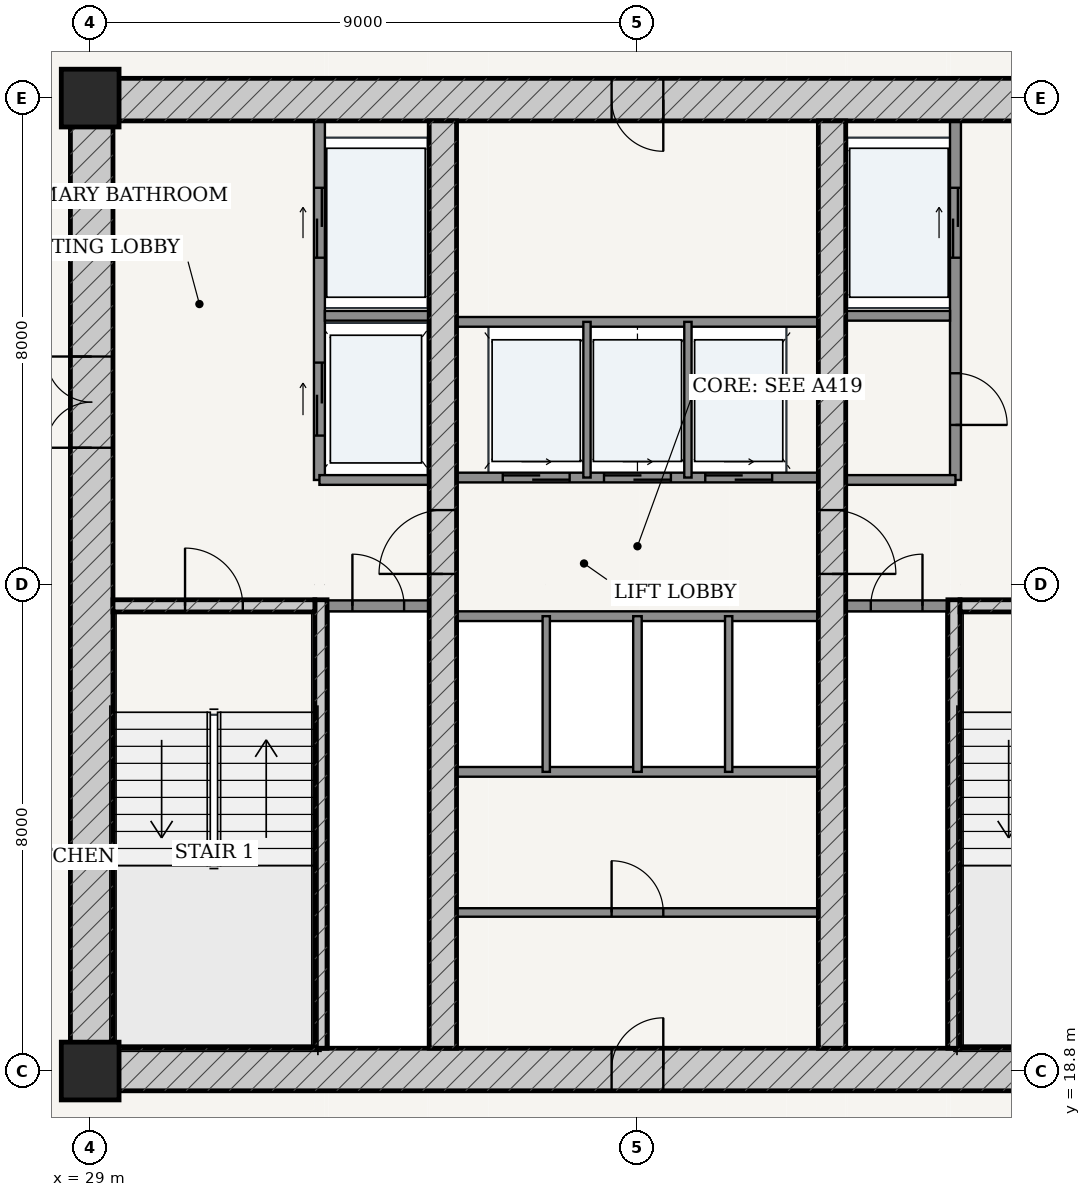
"""IFC4 building model, lengths in metres.
Left out: names, types, materials, properties, quantities, classifications, styles, units other than length and angle.
Written with IfcOpenShell. Run it as: python <this file> out.ifc"""

import sys

from ifc_helpers import new_model, si_unit, direction, frame, frame_2d, origin, origin_2d, place, context, subcontext, project, spatial, rectangle, extrude, source, transform, mapped, element, fill, save


model = new_model("IFC4")
c1 = context("Model", 3, precision=1e-05, world=origin(), true_north=direction((-0.2419218956, 0.970295726276)))
c2 = subcontext(c1, "Body", "Model", "MODEL_VIEW")
j1 = project(units=[si_unit("LENGTHUNIT", "METRE"), si_unit("PLANEANGLEUNIT", "RADIAN")], contexts=[c1])
p1 = place(None, origin())
s1 = spatial("IfcSite", under=j1, at=p1, CompositionType="ELEMENT")
p2 = place(p1, origin())
s2 = spatial("IfcBuilding", under=s1, at=p2, CompositionType="ELEMENT")
p3 = place(p2, frame((0.0, 0.0, 126.6)))
s3 = spatial("IfcBuildingStorey", under=s2, at=p3, CompositionType="ELEMENT", Elevation=126.6)
for number, where, z_axis, x_axis in (
    (1, (29.0, 18.8, 0.0), (0.0, 0.0, 1.0), (1.0, 0.0, 0.0)),
    (2, (29.0, 34.8, 0.0), (0.0, 0.0, 1.0), (1.0, 0.0, 0.0)),
):
    element("IfcColumn", number, at=place(p3, frame(where, z_axis=z_axis, x_axis=x_axis)), inside=s3, PredefinedType="COLUMN", context=c2, shape_type="SweptSolid", body=[
        extrude(rectangle(XDim=0.95, YDim=0.95, at=origin_2d()), origin(), (0.0, 0.0, 1.0), 3.6),
    ])
p4 = place(p3, frame((28.675, 18.825, 0.0), z_axis=(0.0, 0.0, 1.0), x_axis=(1.0, 0.0, 0.0)))
e3 = element("IfcWall", 3, at=p4, inside=s3, PredefinedType="SHEAR", context=c2, shape_type="SweptSolid", body=[
    extrude(rectangle(XDim=18.65, YDim=0.7, at=frame_2d((9.325, 0.0))), origin(), (0.0, 0.0, 1.0), 3.15),
])
p5 = place(p4, frame((8.9, 0.0, 0.0)))
e4 = element("IfcOpeningElement", 4, at=p5, cuts=e3, PredefinedType="OPENING", context=c2, shape_type="SweptSolid", body=[
    extrude(rectangle(XDim=0.85, YDim=2.1, at=frame_2d((0.425, 1.05))), frame((0.0, 0.36, 0.0), z_axis=(0.0, -1.0, 0.0), x_axis=(1.0, 0.0, 0.0)), (0.0, 0.0, 1.0), 0.72),
])
p6 = place(p3, frame((28.675, 34.775, 0.0), z_axis=(0.0, 0.0, 1.0), x_axis=(1.0, 0.0, 0.0)))
e5 = element("IfcWall", 5, at=p6, inside=s3, PredefinedType="SHEAR", context=c2, shape_type="SweptSolid", body=[
    extrude(rectangle(XDim=18.65, YDim=0.7, at=frame_2d((9.325, 0.0))), origin(), (0.0, 0.0, 1.0), 3.15),
])
p7 = place(p6, frame((8.9, 0.0, 0.0)))
e6 = element("IfcOpeningElement", 6, at=p7, cuts=e5, PredefinedType="OPENING", context=c2, shape_type="SweptSolid", body=[
    extrude(rectangle(XDim=0.85, YDim=2.1, at=frame_2d((0.425, 1.05))), frame((0.0, 0.36, 0.0), z_axis=(0.0, -1.0, 0.0), x_axis=(1.0, 0.0, 0.0)), (0.0, 0.0, 1.0), 0.72),
])
p8 = place(p3, frame((29.025, 19.175, 0.0), z_axis=(0.0, 0.0, 1.0), x_axis=(0.0, 1.0, 0.0)))
e7 = element("IfcWall", 7, at=p8, inside=s3, PredefinedType="SHEAR", context=c2, shape_type="SweptSolid", body=[
    extrude(rectangle(XDim=15.25, YDim=0.7, at=frame_2d((7.625, 0.0))), origin(), (0.0, 0.0, 1.0), 3.15),
])
p9 = place(p8, frame((9.875, 0.0, 0.0)))
e8 = element("IfcOpeningElement", 8, at=p9, cuts=e7, PredefinedType="OPENING", context=c2, shape_type="SweptSolid", body=[
    extrude(rectangle(XDim=1.5, YDim=2.2, at=frame_2d((0.75, 1.1))), frame((0.0, 0.36, 0.0), z_axis=(0.0, -1.0, 0.0), x_axis=(1.0, 0.0, 0.0)), (0.0, 0.0, 1.0), 0.72),
])
p10 = place(p3, frame((32.795, 19.175, 0.0), z_axis=(0.0, 0.0, 1.0), x_axis=(0.0, 1.0, 0.0)))
e9 = element("IfcWall", 9, at=p10, inside=s3, PredefinedType="SOLIDWALL", context=c2, shape_type="SweptSolid", body=[
    extrude(rectangle(XDim=7.375, YDim=0.2, at=frame_2d((3.688, 0.0))), origin(), (0.0, 0.0, 1.0), 3.15),
])
p11 = place(p3, frame((29.375, 26.45, 0.0), z_axis=(0.0, 0.0, 1.0), x_axis=(1.0, 0.0, 0.0)))
e10 = element("IfcWall", 10, at=p11, inside=s3, PredefinedType="SOLIDWALL", context=c2, shape_type="SweptSolid", body=[
    extrude(rectangle(XDim=3.32, YDim=0.2, at=frame_2d((1.66, 0.0))), origin(), (0.0, 0.0, 1.0), 3.15),
])
p12 = place(p11, frame((1.185, 0.0, 0.0)))
e11 = element("IfcOpeningElement", 11, at=p12, cuts=e10, PredefinedType="OPENING", context=c2, shape_type="SweptSolid", body=[
    extrude(rectangle(XDim=0.95, YDim=2.15, at=frame_2d((0.475, 1.075))), frame((0.0, 0.11, 0.0), z_axis=(0.0, -1.0, 0.0), x_axis=(1.0, 0.0, 0.0)), (0.0, 0.0, 1.0), 0.22),
])
p13 = place(p3, frame((43.205, 19.175, 0.0), z_axis=(0.0, 0.0, 1.0), x_axis=(0.0, 1.0, 0.0)))
e12 = element("IfcWall", 12, at=p13, inside=s3, PredefinedType="SOLIDWALL", context=c2, shape_type="SweptSolid", body=[
    extrude(rectangle(XDim=7.375, YDim=0.2, at=frame_2d((3.688, 0.0))), origin(), (0.0, 0.0, 1.0), 3.15),
])
p14 = place(p3, frame((43.305, 26.45, 0.0), z_axis=(0.0, 0.0, 1.0), x_axis=(1.0, 0.0, 0.0)))
e13 = element("IfcWall", 13, at=p14, inside=s3, PredefinedType="SOLIDWALL", context=c2, shape_type="SweptSolid", body=[
    extrude(rectangle(XDim=3.32, YDim=0.2, at=frame_2d((1.66, 0.0))), origin(), (0.0, 0.0, 1.0), 3.15),
])
p15 = place(p14, frame((1.185, 0.0, 0.0)))
e14 = element("IfcOpeningElement", 14, at=p15, cuts=e13, PredefinedType="OPENING", context=c2, shape_type="SweptSolid", body=[
    extrude(rectangle(XDim=0.95, YDim=2.15, at=frame_2d((0.475, 1.075))), frame((0.0, 0.11, 0.0), z_axis=(0.0, -1.0, 0.0), x_axis=(1.0, 0.0, 0.0)), (0.0, 0.0, 1.0), 0.22),
])
p16 = place(p3, frame((34.8, 19.175, 0.0), z_axis=(0.0, 0.0, 1.0), x_axis=(0.0, 1.0, 0.0)))
e15 = element("IfcWall", 15, at=p16, inside=s3, PredefinedType="SHEAR", context=c2, shape_type="SweptSolid", body=[
    extrude(rectangle(XDim=15.25, YDim=0.45, at=frame_2d((7.625, 0.0))), origin(), (0.0, 0.0, 1.0), 3.15),
])
p17 = place(p16, frame((7.8, 0.0, 0.0)))
e16 = element("IfcOpeningElement", 16, at=p17, cuts=e15, PredefinedType="OPENING", context=c2, shape_type="SweptSolid", body=[
    extrude(rectangle(XDim=1.05, YDim=2.15, at=frame_2d((0.525, 1.075))), frame((0.0, 0.235, 0.0), z_axis=(0.0, -1.0, 0.0), x_axis=(1.0, 0.0, 0.0)), (0.0, 0.0, 1.0), 0.47),
])
p18 = place(p3, frame((41.2, 19.175, 0.0), z_axis=(0.0, 0.0, 1.0), x_axis=(0.0, 1.0, 0.0)))
e17 = element("IfcWall", 17, at=p18, inside=s3, PredefinedType="SHEAR", context=c2, shape_type="SweptSolid", body=[
    extrude(rectangle(XDim=15.25, YDim=0.45, at=frame_2d((7.625, 0.0))), origin(), (0.0, 0.0, 1.0), 3.15),
])
p19 = place(p18, frame((7.8, 0.0, 0.0)))
e18 = element("IfcOpeningElement", 18, at=p19, cuts=e17, PredefinedType="OPENING", context=c2, shape_type="SweptSolid", body=[
    extrude(rectangle(XDim=1.05, YDim=2.15, at=frame_2d((0.525, 1.075))), frame((0.0, 0.235, 0.0), z_axis=(0.0, -1.0, 0.0), x_axis=(1.0, 0.0, 0.0)), (0.0, 0.0, 1.0), 0.47),
])
p20 = place(p3, frame((32.9, 26.45, 0.0), z_axis=(0.0, 0.0, 1.0), x_axis=(1.0, 0.0, 0.0)))
e19 = element("IfcWall", 19, at=p20, inside=s3, PredefinedType="PARTITIONING", context=c2, shape_type="SweptSolid", body=[
    extrude(rectangle(XDim=1.675, YDim=0.18, at=frame_2d((0.837, 0.0))), origin(), (0.0, 0.0, 1.0), 3.15),
])
p21 = place(p20, frame((0.413, 0.0, 0.0)))
e20 = element("IfcOpeningElement", 20, at=p21, cuts=e19, PredefinedType="OPENING", context=c2, shape_type="SweptSolid", body=[
    extrude(rectangle(XDim=0.85, YDim=2.1, at=frame_2d((0.425, 1.05))), frame((0.0, 0.1, 0.0), z_axis=(0.0, -1.0, 0.0), x_axis=(1.0, 0.0, 0.0)), (0.0, 0.0, 1.0), 0.2),
])
p22 = place(p3, frame((41.425, 26.45, 0.0), z_axis=(0.0, 0.0, 1.0), x_axis=(1.0, 0.0, 0.0)))
e21 = element("IfcWall", 21, at=p22, inside=s3, PredefinedType="PARTITIONING", context=c2, shape_type="SweptSolid", body=[
    extrude(rectangle(XDim=1.675, YDim=0.18, at=frame_2d((0.837, 0.0))), origin(), (0.0, 0.0, 1.0), 3.15),
])
p23 = place(p22, frame((0.413, 0.0, 0.0)))
e22 = element("IfcOpeningElement", 22, at=p23, cuts=e21, PredefinedType="OPENING", context=c2, shape_type="SweptSolid", body=[
    extrude(rectangle(XDim=0.85, YDim=2.1, at=frame_2d((0.425, 1.05))), frame((0.0, 0.1, 0.0), z_axis=(0.0, -1.0, 0.0), x_axis=(1.0, 0.0, 0.0)), (0.0, 0.0, 1.0), 0.2),
])
p24 = place(p3, frame((32.77, 28.52, 0.0), z_axis=(0.0, 0.0, 1.0), x_axis=(0.0, 1.0, 0.0)))
e23 = element("IfcWall", 23, at=p24, inside=s3, PredefinedType="PARTITIONING", context=c2, shape_type="SweptSolid", body=[
    extrude(rectangle(XDim=5.905, YDim=0.18, at=frame_2d((2.953, 0.0))), origin(), (0.0, 0.0, 1.0), 3.15),
])
p25 = place(p24, frame((3.655, 0.0, 0.0)))
e24 = element("IfcOpeningElement", 24, at=p25, cuts=e23, PredefinedType="OPENING", context=c2, shape_type="SweptSolid", body=[
    extrude(rectangle(XDim=1.15, YDim=2.2, at=frame_2d((0.575, 1.1))), frame((0.0, 0.1, 0.0), z_axis=(0.0, -1.0, 0.0), x_axis=(1.0, 0.0, 0.0)), (0.0, 0.0, 1.0), 0.2),
])
p26 = place(p24, frame((0.73, 0.0, 0.0)))
e25 = element("IfcOpeningElement", 25, at=p26, cuts=e23, PredefinedType="OPENING", context=c2, shape_type="SweptSolid", body=[
    extrude(rectangle(XDim=1.2, YDim=2.25, at=frame_2d((0.6, 1.125))), frame((0.0, 0.1, 0.0), z_axis=(0.0, -1.0, 0.0), x_axis=(1.0, 0.0, 0.0)), (0.0, 0.0, 1.0), 0.2),
])
p27 = place(p3, frame((32.86, 31.22, 0.0), z_axis=(0.0, 0.0, 1.0), x_axis=(1.0, 0.0, 0.0)))
e26 = element("IfcWall", 26, at=p27, inside=s3, PredefinedType="PARTITIONING", context=c2, shape_type="SweptSolid", body=[
    extrude(rectangle(XDim=1.715, YDim=0.16, at=frame_2d((0.857, 0.0))), origin(), (0.0, 0.0, 1.0), 3.15),
])
p28 = place(p3, frame((32.77, 28.52, 0.0), z_axis=(0.0, 0.0, 1.0), x_axis=(1.0, 0.0, 0.0)))
e27 = element("IfcWall", 27, at=p28, inside=s3, PredefinedType="PARTITIONING", context=c2, shape_type="SweptSolid", body=[
    extrude(rectangle(XDim=1.805, YDim=0.16, at=frame_2d((0.902, 0.0))), origin(), (0.0, 0.0, 1.0), 3.15),
])
p29 = place(p3, frame((43.23, 28.52, 0.0), z_axis=(0.0, 0.0, 1.0), x_axis=(0.0, 1.0, 0.0)))
e28 = element("IfcWall", 28, at=p29, inside=s3, PredefinedType="PARTITIONING", context=c2, shape_type="SweptSolid", body=[
    extrude(rectangle(XDim=5.905, YDim=0.18, at=frame_2d((2.953, 0.0))), origin(), (0.0, 0.0, 1.0), 3.15),
])
p30 = place(p29, frame((0.905, 0.0, 0.0)))
e29 = element("IfcOpeningElement", 29, at=p30, cuts=e28, PredefinedType="OPENING", context=c2, shape_type="SweptSolid", body=[
    extrude(rectangle(XDim=0.85, YDim=2.1, at=frame_2d((0.425, 1.05))), frame((0.0, 0.1, 0.0), z_axis=(0.0, -1.0, 0.0), x_axis=(1.0, 0.0, 0.0)), (0.0, 0.0, 1.0), 0.2),
])
p31 = place(p29, frame((3.655, 0.0, 0.0)))
e30 = element("IfcOpeningElement", 30, at=p31, cuts=e28, PredefinedType="OPENING", context=c2, shape_type="SweptSolid", body=[
    extrude(rectangle(XDim=1.15, YDim=2.2, at=frame_2d((0.575, 1.1))), frame((0.0, 0.1, 0.0), z_axis=(0.0, -1.0, 0.0), x_axis=(1.0, 0.0, 0.0)), (0.0, 0.0, 1.0), 0.2),
])
p32 = place(p3, frame((41.425, 31.22, 0.0), z_axis=(0.0, 0.0, 1.0), x_axis=(1.0, 0.0, 0.0)))
e31 = element("IfcWall", 31, at=p32, inside=s3, PredefinedType="PARTITIONING", context=c2, shape_type="SweptSolid", body=[
    extrude(rectangle(XDim=1.715, YDim=0.16, at=frame_2d((0.857, 0.0))), origin(), (0.0, 0.0, 1.0), 3.15),
])
p33 = place(p3, frame((41.425, 28.52, 0.0), z_axis=(0.0, 0.0, 1.0), x_axis=(1.0, 0.0, 0.0)))
e32 = element("IfcWall", 32, at=p33, inside=s3, PredefinedType="PARTITIONING", context=c2, shape_type="SweptSolid", body=[
    extrude(rectangle(XDim=1.805, YDim=0.16, at=frame_2d((0.902, 0.0))), origin(), (0.0, 0.0, 1.0), 3.15),
])
p34 = place(p3, frame((35.025, 28.56, 0.0), z_axis=(0.0, 0.0, 1.0), x_axis=(1.0, 0.0, 0.0)))
e33 = element("IfcWall", 33, at=p34, inside=s3, PredefinedType="PARTITIONING", context=c2, shape_type="SweptSolid", body=[
    extrude(rectangle(XDim=5.95, YDim=0.16, at=frame_2d((2.975, 0.0))), origin(), (0.0, 0.0, 1.0), 3.15),
])
p35 = place(p34, frame((0.76, 0.0, 0.0)))
e34 = element("IfcOpeningElement", 34, at=p35, cuts=e33, PredefinedType="OPENING", context=c2, shape_type="SweptSolid", body=[
    extrude(rectangle(XDim=1.1, YDim=2.2, at=frame_2d((0.55, 1.1))), frame((0.0, 0.09, 0.0), z_axis=(0.0, -1.0, 0.0), x_axis=(1.0, 0.0, 0.0)), (0.0, 0.0, 1.0), 0.18),
])
p36 = place(p34, frame((2.425, 0.0, 0.0)))
e35 = element("IfcOpeningElement", 35, at=p36, cuts=e33, PredefinedType="OPENING", context=c2, shape_type="SweptSolid", body=[
    extrude(rectangle(XDim=1.1, YDim=2.2, at=frame_2d((0.55, 1.1))), frame((0.0, 0.09, 0.0), z_axis=(0.0, -1.0, 0.0), x_axis=(1.0, 0.0, 0.0)), (0.0, 0.0, 1.0), 0.18),
])
p37 = place(p34, frame((4.09, 0.0, 0.0)))
e36 = element("IfcOpeningElement", 36, at=p37, cuts=e33, PredefinedType="OPENING", context=c2, shape_type="SweptSolid", body=[
    extrude(rectangle(XDim=1.1, YDim=2.2, at=frame_2d((0.55, 1.1))), frame((0.0, 0.09, 0.0), z_axis=(0.0, -1.0, 0.0), x_axis=(1.0, 0.0, 0.0)), (0.0, 0.0, 1.0), 0.18),
])
p38 = place(p3, frame((35.025, 31.12, 0.0), z_axis=(0.0, 0.0, 1.0), x_axis=(1.0, 0.0, 0.0)))
e37 = element("IfcWall", 37, at=p38, inside=s3, PredefinedType="PARTITIONING", context=c2, shape_type="SweptSolid", body=[
    extrude(rectangle(XDim=5.95, YDim=0.16, at=frame_2d((2.975, 0.0))), origin(), (0.0, 0.0, 1.0), 3.15),
])
for number, where, z_axis, x_axis in (
    (38, (37.17, 28.56, 0.0), (0.0, 0.0, 1.0), (0.0, 1.0, 0.0)),
    (39, (38.83, 28.56, 0.0), (0.0, 0.0, 1.0), (0.0, 1.0, 0.0)),
):
    element("IfcWall", number, at=place(p3, frame(where, z_axis=z_axis, x_axis=x_axis)), inside=s3, PredefinedType="PARTITIONING", context=c2, shape_type="SweptSolid", body=[
        extrude(rectangle(XDim=2.56, YDim=0.12, at=frame_2d((1.28, 0.0))), origin(), (0.0, 0.0, 1.0), 3.15),
    ])
for number, where, z_axis, x_axis in (
    (40, (35.025, 26.28, 0.0), (0.0, 0.0, 1.0), (1.0, 0.0, 0.0)),
    (41, (35.025, 23.72, 0.0), (0.0, 0.0, 1.0), (1.0, 0.0, 0.0)),
):
    element("IfcWall", number, at=place(p3, frame(where, z_axis=z_axis, x_axis=x_axis)), inside=s3, PredefinedType="PARTITIONING", context=c2, shape_type="SweptSolid", body=[
        extrude(rectangle(XDim=5.95, YDim=0.16, at=frame_2d((2.975, 0.0))), origin(), (0.0, 0.0, 1.0), 3.15),
    ])
p39 = place(p3, frame((36.5, 23.72, 0.0), z_axis=(0.0, 0.0, 1.0), x_axis=(0.0, 1.0, 0.0)))
e42 = element("IfcWall", 42, at=p39, inside=s3, PredefinedType="PARTITIONING", context=c2, shape_type="SweptSolid", body=[
    extrude(rectangle(XDim=2.56, YDim=0.12, at=frame_2d((1.28, 0.0))), origin(), (0.0, 0.0, 1.0), 3.15),
])
p40 = place(p3, frame((38.0, 23.72, 0.0), z_axis=(0.0, 0.0, 1.0), x_axis=(0.0, 1.0, 0.0)))
e43 = element("IfcWall", 43, at=p40, inside=s3, PredefinedType="PARTITIONING", context=c2, shape_type="SweptSolid", body=[
    extrude(rectangle(XDim=2.56, YDim=0.14, at=frame_2d((1.28, 0.0))), origin(), (0.0, 0.0, 1.0), 3.15),
])
p41 = place(p3, frame((39.5, 23.72, 0.0), z_axis=(0.0, 0.0, 1.0), x_axis=(0.0, 1.0, 0.0)))
e44 = element("IfcWall", 44, at=p41, inside=s3, PredefinedType="PARTITIONING", context=c2, shape_type="SweptSolid", body=[
    extrude(rectangle(XDim=2.56, YDim=0.12, at=frame_2d((1.28, 0.0))), origin(), (0.0, 0.0, 1.0), 3.15),
])
p42 = place(p3, frame((35.025, 21.407, 0.0), z_axis=(0.0, 0.0, 1.0), x_axis=(1.0, 0.0, 0.0)))
e45 = element("IfcWall", 45, at=p42, inside=s3, PredefinedType="PARTITIONING", context=c2, shape_type="SweptSolid", body=[
    extrude(rectangle(XDim=5.95, YDim=0.14, at=frame_2d((2.975, 0.0))), origin(), (0.0, 0.0, 1.0), 3.15),
])
p43 = place(p42, frame((2.55, 0.0, 0.0)))
e46 = element("IfcOpeningElement", 46, at=p43, cuts=e45, PredefinedType="OPENING", context=c2, shape_type="SweptSolid", body=[
    extrude(rectangle(XDim=0.85, YDim=2.1, at=frame_2d((0.425, 1.05))), frame((0.0, 0.08, 0.0), z_axis=(0.0, -1.0, 0.0), x_axis=(1.0, 0.0, 0.0)), (0.0, 0.0, 1.0), 0.16),
])
m1 = source(origin(), c2, "Body", "SweptSolid", [
    extrude(rectangle(XDim=1.5, YDim=2.2, at=frame_2d((0.75, 1.1))), frame((0.0, 0.025, 0.0), z_axis=(0.0, -1.0, 0.0), x_axis=(1.0, 0.0, 0.0)), (0.0, 0.0, 1.0), 0.05),
])
p44 = place(p9, origin())
e47 = element("IfcDoor", 47, at=p44, inside=s3, OperationType="DOUBLE_DOOR_SINGLE_SWING", PredefinedType="DOOR", context=c2, shape_type="MappedRepresentation", body=[
    mapped(m1, transform((0.0, 0.0, 0.0), scale=1.0)),
])
fill(e8, e47)
m2 = source(origin(), c2, "Body", "SweptSolid", [
    extrude(rectangle(XDim=1.05, YDim=2.15, at=frame_2d((0.525, 1.075))), frame((0.0, 0.025, 0.0), z_axis=(0.0, -1.0, 0.0), x_axis=(1.0, 0.0, 0.0)), (0.0, 0.0, 1.0), 0.05),
])
p45 = place(p17, origin())
e48 = element("IfcDoor", 48, at=p45, inside=s3, OperationType="SINGLE_SWING_LEFT", PredefinedType="DOOR", context=c2, shape_type="MappedRepresentation", body=[
    mapped(m2, transform((0.0, 0.0, 0.0), scale=1.0)),
])
fill(e16, e48)
p46 = place(p19, frame((1.05, 0.0, 0.0), z_axis=(0.0, 0.0, 1.0), x_axis=(-1.0, 0.0, 0.0)))
e49 = element("IfcDoor", 49, at=p46, inside=s3, OperationType="SINGLE_SWING_RIGHT", PredefinedType="DOOR", context=c2, shape_type="MappedRepresentation", body=[
    mapped(m2, transform((0.0, 0.0, 0.0), scale=1.0)),
])
fill(e18, e49)
m3 = source(origin(), c2, "Body", "SweptSolid", [
    extrude(rectangle(XDim=0.95, YDim=2.15, at=frame_2d((0.475, 1.075))), frame((0.0, 0.025, 0.0), z_axis=(0.0, -1.0, 0.0), x_axis=(1.0, 0.0, 0.0)), (0.0, 0.0, 1.0), 0.05),
])
p47 = place(p12, origin())
e50 = element("IfcDoor", 50, at=p47, inside=s3, OperationType="SINGLE_SWING_LEFT", PredefinedType="DOOR", context=c2, shape_type="MappedRepresentation", body=[
    mapped(m3, transform((0.0, 0.0, 0.0), scale=1.0)),
])
fill(e11, e50)
m4 = source(origin(), c2, "Body", "SweptSolid", [
    extrude(rectangle(XDim=0.85, YDim=2.1, at=frame_2d((0.425, 1.05))), frame((0.0, 0.025, 0.0), z_axis=(0.0, -1.0, 0.0), x_axis=(1.0, 0.0, 0.0)), (0.0, 0.0, 1.0), 0.05),
])
p48 = place(p21, origin())
e51 = element("IfcDoor", 51, at=p48, inside=s3, OperationType="SINGLE_SWING_LEFT", PredefinedType="DOOR", context=c2, shape_type="MappedRepresentation", body=[
    mapped(m4, transform((0.0, 0.0, 0.0), scale=1.0)),
])
fill(e20, e51)
p49 = place(p23, origin())
e52 = element("IfcDoor", 52, at=p49, inside=s3, OperationType="SINGLE_SWING_RIGHT", PredefinedType="DOOR", context=c2, shape_type="MappedRepresentation", body=[
    mapped(m4, transform((0.0, 0.0, 0.0), scale=1.0)),
])
fill(e22, e52)
p50 = place(p30, frame((0.85, 0.0, 0.0), z_axis=(0.0, 0.0, 1.0), x_axis=(-1.0, 0.0, 0.0)))
e53 = element("IfcDoor", 53, at=p50, inside=s3, OperationType="SINGLE_SWING_RIGHT", PredefinedType="DOOR", context=c2, shape_type="MappedRepresentation", body=[
    mapped(m4, transform((0.0, 0.0, 0.0), scale=1.0)),
])
fill(e29, e53)
p51 = place(p7, frame((0.85, 0.0, 0.0), z_axis=(0.0, 0.0, 1.0), x_axis=(-1.0, 0.0, 0.0)))
e54 = element("IfcDoor", 54, at=p51, inside=s3, OperationType="SINGLE_SWING_LEFT", PredefinedType="DOOR", context=c2, shape_type="MappedRepresentation", body=[
    mapped(m4, transform((0.0, 0.0, 0.0), scale=1.0)),
])
fill(e6, e54)
p52 = place(p5, origin())
e55 = element("IfcDoor", 55, at=p52, inside=s3, OperationType="SINGLE_SWING_RIGHT", PredefinedType="DOOR", context=c2, shape_type="MappedRepresentation", body=[
    mapped(m4, transform((0.0, 0.0, 0.0), scale=1.0)),
])
fill(e4, e55)
p53 = place(p43, origin())
e56 = element("IfcDoor", 56, at=p53, inside=s3, OperationType="SINGLE_SWING_LEFT", PredefinedType="DOOR", context=c2, shape_type="MappedRepresentation", body=[
    mapped(m4, transform((0.0, 0.0, 0.0), scale=1.0)),
])
fill(e46, e56)
m5 = source(origin(), c2, "Body", "SweptSolid", [
    extrude(rectangle(XDim=1.15, YDim=2.2, at=frame_2d((0.575, 1.1))), frame((0.0, 0.025, 0.0), z_axis=(0.0, -1.0, 0.0), x_axis=(1.0, 0.0, 0.0)), (0.0, 0.0, 1.0), 0.05),
])
p54 = place(p25, origin())
e57 = element("IfcDoor", 57, at=p54, inside=s3, OperationType="DOUBLE_DOOR_SLIDING", PredefinedType="DOOR", context=c2, shape_type="MappedRepresentation", body=[
    mapped(m5, transform((0.0, 0.0, 0.0), scale=1.0)),
])
fill(e24, e57)
p55 = place(p31, origin())
e58 = element("IfcDoor", 58, at=p55, inside=s3, OperationType="DOUBLE_DOOR_SLIDING", PredefinedType="DOOR", context=c2, shape_type="MappedRepresentation", body=[
    mapped(m5, transform((0.0, 0.0, 0.0), scale=1.0)),
])
fill(e30, e58)
m6 = source(origin(), c2, "Body", "SweptSolid", [
    extrude(rectangle(XDim=1.2, YDim=2.25, at=frame_2d((0.6, 1.125))), frame((0.0, 0.025, 0.0), z_axis=(0.0, -1.0, 0.0), x_axis=(1.0, 0.0, 0.0)), (0.0, 0.0, 1.0), 0.05),
])
p56 = place(p26, origin())
e59 = element("IfcDoor", 59, at=p56, inside=s3, OperationType="DOUBLE_DOOR_SLIDING", PredefinedType="DOOR", context=c2, shape_type="MappedRepresentation", body=[
    mapped(m6, transform((0.0, 0.0, 0.0), scale=1.0)),
])
fill(e25, e59)
m7 = source(origin(), c2, "Body", "SweptSolid", [
    extrude(rectangle(XDim=1.1, YDim=2.2, at=frame_2d((0.55, 1.1))), frame((0.0, 0.025, 0.0), z_axis=(0.0, -1.0, 0.0), x_axis=(1.0, 0.0, 0.0)), (0.0, 0.0, 1.0), 0.05),
])
p57 = place(p35, origin())
e60 = element("IfcDoor", 60, at=p57, inside=s3, OperationType="DOUBLE_DOOR_SLIDING", PredefinedType="DOOR", context=c2, shape_type="MappedRepresentation", body=[
    mapped(m7, transform((0.0, 0.0, 0.0), scale=1.0)),
])
fill(e34, e60)
p58 = place(p36, origin())
e61 = element("IfcDoor", 61, at=p58, inside=s3, OperationType="DOUBLE_DOOR_SLIDING", PredefinedType="DOOR", context=c2, shape_type="MappedRepresentation", body=[
    mapped(m7, transform((0.0, 0.0, 0.0), scale=1.0)),
])
fill(e35, e61)
p59 = place(p37, origin())
e62 = element("IfcDoor", 62, at=p59, inside=s3, OperationType="DOUBLE_DOOR_SLIDING", PredefinedType="DOOR", context=c2, shape_type="MappedRepresentation", body=[
    mapped(m7, transform((0.0, 0.0, 0.0), scale=1.0)),
])
fill(e36, e62)
save(model, sys.argv[1])
